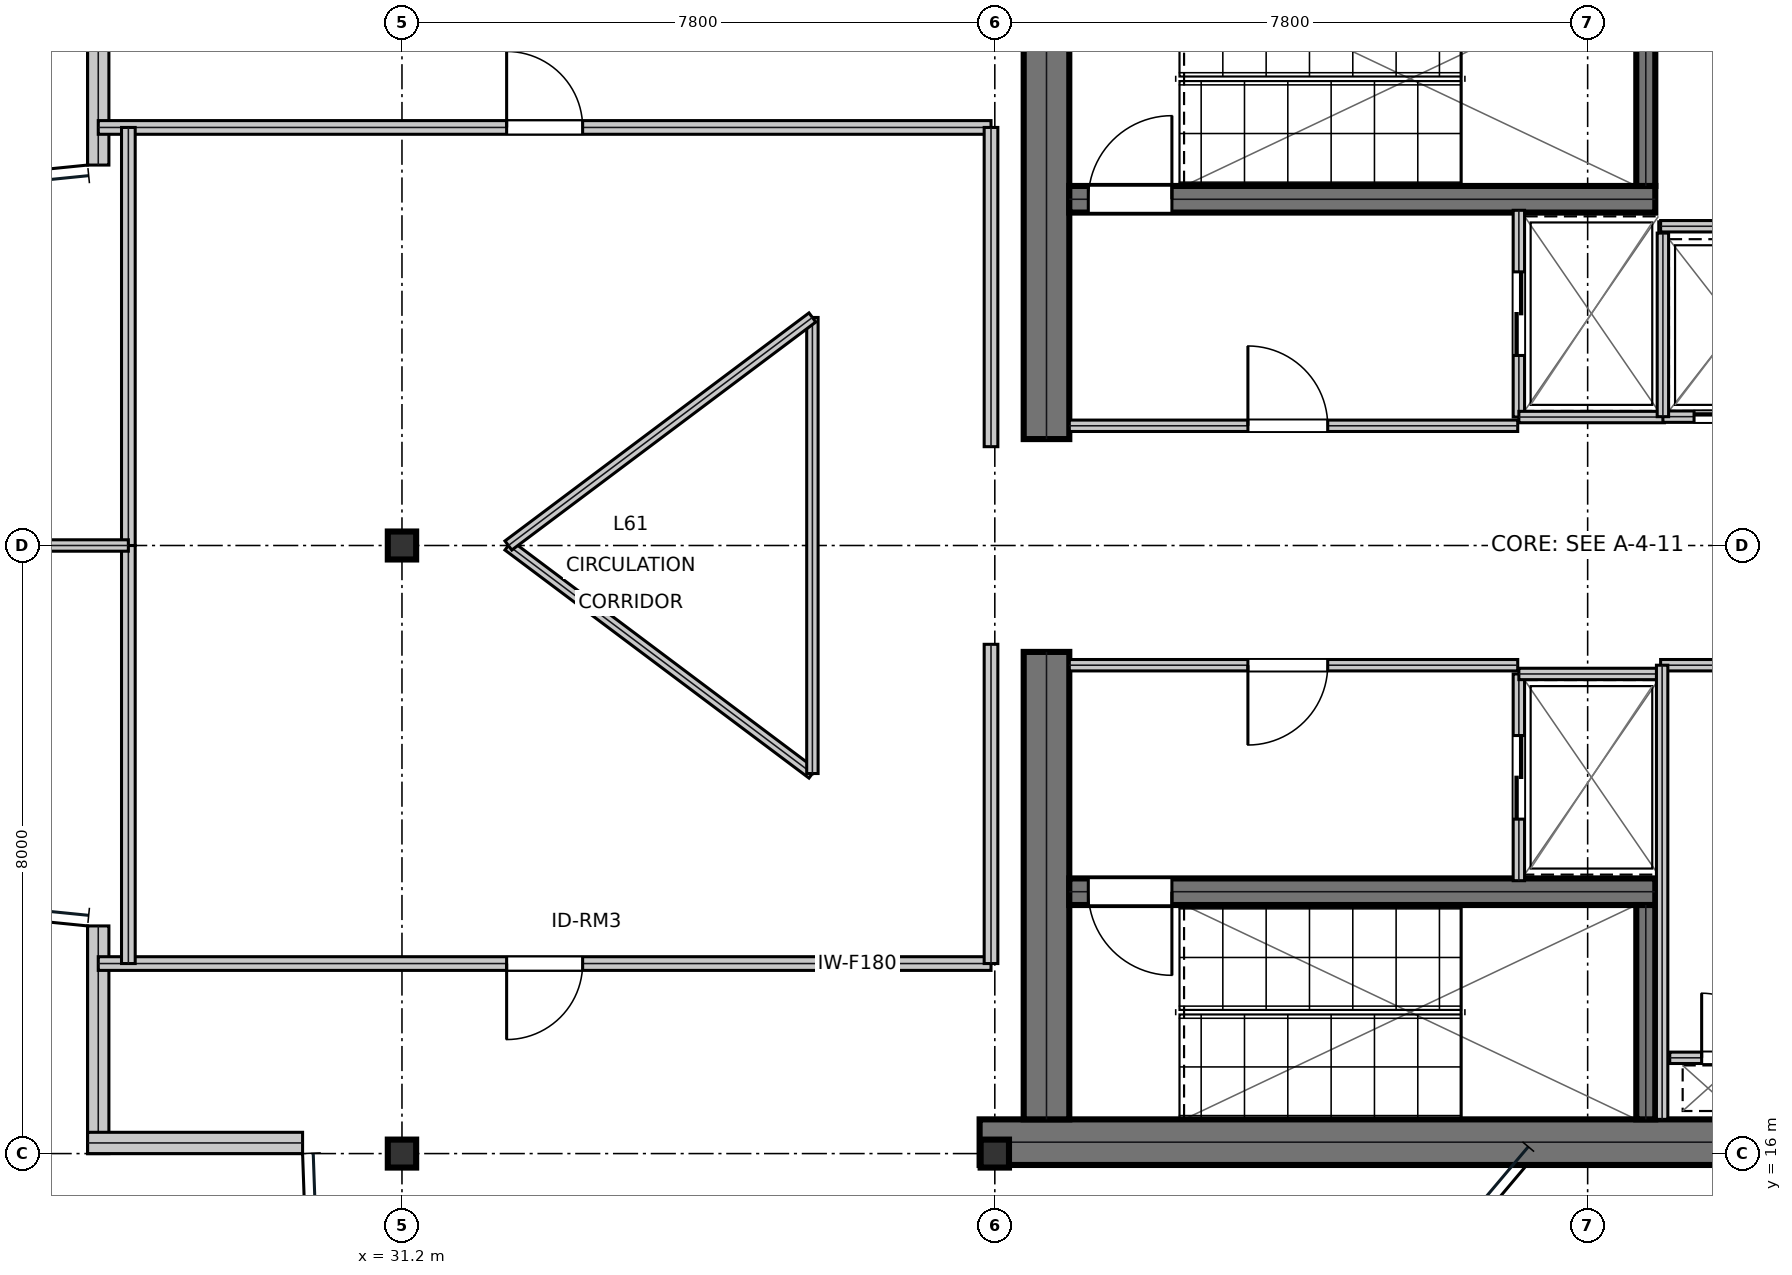
"""IFC4 building model, lengths in metres.
Left out: names, types, materials, properties, quantities, classifications, styles, units other than length and angle.
Written with IfcOpenShell. Run it as: python <this file> out.ifc"""

import sys

from ifc_helpers import new_model, si_unit, direction, frame, frame_2d, origin, origin_2d, place, context, subcontext, project, spatial, rectangle, i_section, extrude, element, fill, save


model = new_model("IFC4")
c1 = context("Model", 3, precision=1e-05, world=origin(), true_north=direction((0.0, 1.0)))
c2 = subcontext(c1, "Body", "Model", "MODEL_VIEW")
j1 = project(units=[si_unit("LENGTHUNIT", "METRE"), si_unit("PLANEANGLEUNIT", "RADIAN")], contexts=[c1])
p1 = place(None, origin())
s1 = spatial("IfcSite", under=j1, at=p1, CompositionType="ELEMENT")
p2 = place(p1, origin())
s2 = spatial("IfcBuilding", under=s1, at=p2, CompositionType="ELEMENT")
p3 = place(p2, frame((0.0, 0.0, 262.05)))
s3 = spatial("IfcBuildingStorey", under=s2, at=p3, CompositionType="ELEMENT", Elevation=262.05)
p4 = place(p3, frame((38.8, 16.15, 0.0), z_axis=(0.0, 0.0, 1.0), x_axis=(1.0, 0.0, 0.0)))
e1 = element("IfcWall", 1, at=p4, inside=s3, PredefinedType="SHEAR", context=c2, shape_type="SweptSolid", body=[
    extrude(rectangle(XDim=16.0, YDim=0.6, at=frame_2d((8.0, 0.0))), origin(), (0.0, 0.0, 1.0), 4.56),
])
for number, where, z_axis, x_axis in (
    (2, (39.68, 16.45, 0.0), (0.0, 0.0, 1.0), (0.0, 1.0, 0.0)),
    (3, (39.68, 25.4, 0.0), (0.0, 0.0, 1.0), (0.0, 1.0, 0.0)),
):
    element("IfcWall", number, at=place(p3, frame(where, z_axis=z_axis, x_axis=x_axis)), inside=s3, PredefinedType="SHEAR", context=c2, shape_type="SweptSolid", body=[
        extrude(rectangle(XDim=6.15, YDim=0.6, at=frame_2d((3.075, 0.0))), origin(), (0.0, 0.0, 1.0), 4.56),
    ])
p5 = place(p3, frame((39.98, 28.555, 0.0), z_axis=(0.0, 0.0, 1.0), x_axis=(1.0, 0.0, 0.0)))
e4 = element("IfcWall", 4, at=p5, inside=s3, PredefinedType="SHEAR", context=c2, shape_type="SweptSolid", body=[
    extrude(rectangle(XDim=7.71, YDim=0.35, at=frame_2d((3.855, 0.0))), origin(), (0.0, 0.0, 1.0), 4.56),
])
p6 = place(p5, frame((0.25, 0.0, 0.0)))
e5 = element("IfcOpeningElement", 5, at=p6, cuts=e4, PredefinedType="OPENING", context=c2, shape_type="SweptSolid", body=[
    extrude(rectangle(XDim=1.1, YDim=2.15, at=frame_2d((0.55, 1.075))), frame((0.0, 0.185, 0.0), z_axis=(0.0, -1.0, 0.0), x_axis=(1.0, 0.0, 0.0)), (0.0, 0.0, 1.0), 0.37),
])
p7 = place(p3, frame((39.98, 19.445, 0.0), z_axis=(0.0, 0.0, 1.0), x_axis=(1.0, 0.0, 0.0)))
e6 = element("IfcWall", 6, at=p7, inside=s3, PredefinedType="SHEAR", context=c2, shape_type="SweptSolid", body=[
    extrude(rectangle(XDim=7.71, YDim=0.35, at=frame_2d((3.855, 0.0))), origin(), (0.0, 0.0, 1.0), 4.56),
])
p8 = place(p7, frame((0.25, 0.0, 0.0)))
e7 = element("IfcOpeningElement", 7, at=p8, cuts=e6, PredefinedType="OPENING", context=c2, shape_type="SweptSolid", body=[
    extrude(rectangle(XDim=1.1, YDim=2.15, at=frame_2d((0.55, 1.075))), frame((0.0, 0.185, 0.0), z_axis=(0.0, -1.0, 0.0), x_axis=(1.0, 0.0, 0.0)), (0.0, 0.0, 1.0), 0.37),
])
for number, where, z_axis, x_axis in (
    (8, (47.565, 28.73, 0.0), (0.0, 0.0, 1.0), (0.0, 1.0, 0.0)),
    (9, (47.565, 16.45, 0.0), (0.0, 0.0, 1.0), (0.0, 1.0, 0.0)),
):
    element("IfcWall", number, at=place(p3, frame(where, z_axis=z_axis, x_axis=x_axis)), inside=s3, PredefinedType="SHEAR", context=c2, shape_type="SweptSolid", body=[
        extrude(rectangle(XDim=2.82, YDim=0.25, at=frame_2d((1.41, 0.0))), origin(), (0.0, 0.0, 1.0), 4.56),
    ])
for number, where, z_axis, x_axis in (
    (10, (31.2, 16.0, 0.0), (0.0, 0.0, 1.0), (1.0, 0.0, 0.0)),
    (11, (31.2, 24.0, 0.0), (0.0, 0.0, 1.0), (1.0, 0.0, 0.0)),
    (12, (39.0, 16.0, 0.0), (0.0, 0.0, 1.0), (1.0, 0.0, 0.0)),
):
    element("IfcColumn", number, at=place(p3, frame(where, z_axis=z_axis, x_axis=x_axis)), inside=s3, PredefinedType="COLUMN", context=c2, shape_type="SweptSolid", body=[
        extrude(i_section(OverallWidth=0.373, OverallDepth=0.368, WebThickness=0.015, FlangeThickness=0.024, at=origin_2d()), origin(), (0.0, 0.0, 1.0), 4.794),
    ])
for number, where, z_axis, x_axis in (
    (13, (27.204, 32.0, 0.0), (0.0, 0.0, 1.0), (0.0, -1.0, 0.0)),
    (14, (27.204, 18.995, 0.0), (0.0, 0.0, 1.0), (0.0, -1.0, 0.0)),
):
    element("IfcWall", number, at=place(p3, frame(where, z_axis=z_axis, x_axis=x_axis)), inside=s3, PredefinedType="STANDARD", context=c2, shape_type="SweptSolid", body=[
        extrude(rectangle(XDim=2.995, YDim=0.28, at=frame_2d((1.498, 0.0))), origin(), (0.0, 0.0, 1.0), 4.089),
    ])
p9 = place(p3, frame((27.064, 16.14, 0.0), z_axis=(0.0, 0.0, 1.0), x_axis=(1.0, 0.0, 0.0)))
e15 = element("IfcWall", 15, at=p9, inside=s3, PredefinedType="STANDARD", context=c2, shape_type="SweptSolid", body=[
    extrude(rectangle(XDim=2.828, YDim=0.28, at=frame_2d((1.414, 0.0))), origin(), (0.0, 0.0, 1.0), 4.56),
])
p10 = place(p3, frame((39.98, 25.575, 0.0), z_axis=(0.0, 0.0, 1.0), x_axis=(1.0, 0.0, 0.0)))
e16 = element("IfcWall", 16, at=p10, inside=s3, PredefinedType="PARTITIONING", context=c2, shape_type="SweptSolid", body=[
    extrude(rectangle(XDim=5.9, YDim=0.15, at=frame_2d((2.95, 0.0))), origin(), (0.0, 0.0, 1.0), 4.56),
])
p11 = place(p10, frame((2.35, 0.0, 0.0)))
e17 = element("IfcOpeningElement", 17, at=p11, cuts=e16, PredefinedType="OPENING", context=c2, shape_type="SweptSolid", body=[
    extrude(rectangle(XDim=1.05, YDim=2.15, at=frame_2d((0.525, 1.075))), frame((0.0, 0.085, 0.0), z_axis=(0.0, -1.0, 0.0), x_axis=(1.0, 0.0, 0.0)), (0.0, 0.0, 1.0), 0.17),
])
p12 = place(p3, frame((39.98, 22.425, 0.0), z_axis=(0.0, 0.0, 1.0), x_axis=(1.0, 0.0, 0.0)))
e18 = element("IfcWall", 18, at=p12, inside=s3, PredefinedType="PARTITIONING", context=c2, shape_type="SweptSolid", body=[
    extrude(rectangle(XDim=5.9, YDim=0.15, at=frame_2d((2.95, 0.0))), origin(), (0.0, 0.0, 1.0), 4.56),
])
p13 = place(p12, frame((2.35, 0.0, 0.0)))
e19 = element("IfcOpeningElement", 19, at=p13, cuts=e18, PredefinedType="OPENING", context=c2, shape_type="SweptSolid", body=[
    extrude(rectangle(XDim=1.05, YDim=2.15, at=frame_2d((0.525, 1.075))), frame((0.0, 0.085, 0.0), z_axis=(0.0, -1.0, 0.0), x_axis=(1.0, 0.0, 0.0)), (0.0, 0.0, 1.0), 0.17),
])
p14 = place(p3, frame((45.895, 25.69, 0.0), z_axis=(0.0, 0.0, 1.0), x_axis=(0.0, 1.0, 0.0)))
e20 = element("IfcWall", 20, at=p14, inside=s3, PredefinedType="PARTITIONING", context=c2, shape_type="SweptSolid", body=[
    extrude(rectangle(XDim=2.72, YDim=0.15, at=frame_2d((1.36, 0.0))), origin(), (0.0, 0.0, 1.0), 4.56),
])
p15 = place(p14, frame((0.81, 0.0, 0.0)))
e21 = element("IfcOpeningElement", 21, at=p15, cuts=e20, PredefinedType="OPENING", context=c2, shape_type="SweptSolid", body=[
    extrude(rectangle(XDim=1.1, YDim=2.15, at=frame_2d((0.55, 1.075))), frame((0.0, 0.085, 0.0), z_axis=(0.0, -1.0, 0.0), x_axis=(1.0, 0.0, 0.0)), (0.0, 0.0, 1.0), 0.17),
])
p16 = place(p3, frame((45.895, 25.69, 0.0), z_axis=(0.0, 0.0, 1.0), x_axis=(1.0, 0.0, 0.0)))
e22 = element("IfcWall", 22, at=p16, inside=s3, PredefinedType="PARTITIONING", context=c2, shape_type="SweptSolid", body=[
    extrude(rectangle(XDim=1.915, YDim=0.15, at=frame_2d((0.958, 0.0))), origin(), (0.0, 0.0, 1.0), 4.56),
])
p17 = place(p3, frame((45.895, 19.59, 0.0), z_axis=(0.0, 0.0, 1.0), x_axis=(0.0, 1.0, 0.0)))
e23 = element("IfcWall", 23, at=p17, inside=s3, PredefinedType="PARTITIONING", context=c2, shape_type="SweptSolid", body=[
    extrude(rectangle(XDim=2.72, YDim=0.15, at=frame_2d((1.36, 0.0))), origin(), (0.0, 0.0, 1.0), 4.56),
])
p18 = place(p17, frame((0.81, 0.0, 0.0)))
e24 = element("IfcOpeningElement", 24, at=p18, cuts=e23, PredefinedType="OPENING", context=c2, shape_type="SweptSolid", body=[
    extrude(rectangle(XDim=1.1, YDim=2.15, at=frame_2d((0.55, 1.075))), frame((0.0, 0.085, 0.0), z_axis=(0.0, -1.0, 0.0), x_axis=(1.0, 0.0, 0.0)), (0.0, 0.0, 1.0), 0.17),
])
p19 = place(p3, frame((45.895, 22.31, 0.0), z_axis=(0.0, 0.0, 1.0), x_axis=(1.0, 0.0, 0.0)))
e25 = element("IfcWall", 25, at=p19, inside=s3, PredefinedType="PARTITIONING", context=c2, shape_type="SweptSolid", body=[
    extrude(rectangle(XDim=1.915, YDim=0.15, at=frame_2d((0.958, 0.0))), origin(), (0.0, 0.0, 1.0), 4.56),
])
p20 = place(p3, frame((47.79, 25.695, 0.0), z_axis=(0.0, 0.0, 1.0), x_axis=(1.0, 0.0, 0.0)))
e26 = element("IfcWall", 26, at=p20, inside=s3, PredefinedType="PARTITIONING", context=c2, shape_type="SweptSolid", body=[
    extrude(rectangle(XDim=1.92, YDim=0.15, at=frame_2d((0.96, 0.0))), origin(), (0.0, 0.0, 1.0), 4.56),
])
p21 = place(p20, frame((0.41, 0.0, 0.0)))
e27 = element("IfcOpeningElement", 27, at=p21, cuts=e26, PredefinedType="OPENING", context=c2, shape_type="SweptSolid", body=[
    extrude(rectangle(XDim=1.1, YDim=2.15, at=frame_2d((0.55, 1.075))), frame((0.0, 0.085, 0.0), z_axis=(0.0, -1.0, 0.0), x_axis=(1.0, 0.0, 0.0)), (0.0, 0.0, 1.0), 0.17),
])
p22 = place(p3, frame((47.79, 25.695, 0.0), z_axis=(0.0, 0.0, 1.0), x_axis=(0.0, 1.0, 0.0)))
e28 = element("IfcWall", 28, at=p22, inside=s3, PredefinedType="PARTITIONING", context=c2, shape_type="SweptSolid", body=[
    extrude(rectangle(XDim=2.415, YDim=0.15, at=frame_2d((1.208, 0.0))), origin(), (0.0, 0.0, 1.0), 4.56),
])
p23 = place(p3, frame((47.88, 17.26, 0.0), z_axis=(0.0, 0.0, 1.0), x_axis=(1.0, 0.0, 0.0)))
e29 = element("IfcWall", 29, at=p23, inside=s3, PredefinedType="PARTITIONING", context=c2, shape_type="SweptSolid", body=[
    extrude(rectangle(XDim=1.72, YDim=0.15, at=frame_2d((0.86, 0.0))), origin(), (0.0, 0.0, 1.0), 4.56),
])
p24 = place(p23, frame((0.42, 0.0, 0.0)))
e30 = element("IfcOpeningElement", 30, at=p24, cuts=e29, PredefinedType="OPENING", context=c2, shape_type="SweptSolid", body=[
    extrude(rectangle(XDim=0.85, YDim=2.15, at=frame_2d((0.425, 1.075))), frame((0.0, 0.085, 0.0), z_axis=(0.0, -1.0, 0.0), x_axis=(1.0, 0.0, 0.0)), (0.0, 0.0, 1.0), 0.17),
])
p25 = place(p3, frame((47.76, 22.425, 0.0), z_axis=(0.0, 0.0, 1.0), x_axis=(1.0, 0.0, 0.0)))
e31 = element("IfcWall", 31, at=p25, inside=s3, PredefinedType="PARTITIONING", context=c2, shape_type="SweptSolid", body=[
    extrude(rectangle(XDim=1.96, YDim=0.15, at=frame_2d((0.98, 0.0))), origin(), (0.0, 0.0, 1.0), 4.56),
])
p26 = place(p3, frame((47.78, 16.45, 0.0), z_axis=(0.0, 0.0, 1.0), x_axis=(0.0, 1.0, 0.0)))
e32 = element("IfcWall", 32, at=p26, inside=s3, PredefinedType="PARTITIONING", context=c2, shape_type="SweptSolid", body=[
    extrude(rectangle(XDim=5.975, YDim=0.15, at=frame_2d((2.988, 0.0))), origin(), (0.0, 0.0, 1.0), 4.56),
])
p27 = place(p3, frame((47.76, 28.2, 0.0), z_axis=(0.0, 0.0, 1.0), x_axis=(1.0, 0.0, 0.0)))
e33 = element("IfcWall", 33, at=p27, inside=s3, PredefinedType="PARTITIONING", context=c2, shape_type="SweptSolid", body=[
    extrude(rectangle(XDim=2.04, YDim=0.15, at=frame_2d((1.02, 0.0))), origin(), (0.0, 0.0, 1.0), 4.56),
])
p28 = place(p3, frame((27.204, 18.5, 0.0), z_axis=(0.0, 0.0, 1.0), x_axis=(1.0, 0.0, 0.0)))
e34 = element("IfcWall", 34, at=p28, inside=s3, PredefinedType="SOLIDWALL", context=c2, shape_type="SweptSolid", body=[
    extrude(rectangle(XDim=11.746, YDim=0.18, at=frame_2d((5.873, 0.0))), origin(), (0.0, 0.0, 1.0), 4.02),
])
p29 = place(p28, frame((5.373, 0.0, 0.0)))
e35 = element("IfcOpeningElement", 35, at=p29, cuts=e34, PredefinedType="OPENING", context=c2, shape_type="SweptSolid", body=[
    extrude(rectangle(XDim=1.0, YDim=2.15, at=frame_2d((0.5, 1.075))), frame((0.0, 0.1, 0.0), z_axis=(0.0, -1.0, 0.0), x_axis=(1.0, 0.0, 0.0)), (0.0, 0.0, 1.0), 0.2),
])
p30 = place(p3, frame((27.204, 29.5, 0.0), z_axis=(0.0, 0.0, 1.0), x_axis=(1.0, 0.0, 0.0)))
e36 = element("IfcWall", 36, at=p30, inside=s3, PredefinedType="SOLIDWALL", context=c2, shape_type="SweptSolid", body=[
    extrude(rectangle(XDim=11.746, YDim=0.18, at=frame_2d((5.873, 0.0))), origin(), (0.0, 0.0, 1.0), 4.02),
])
p31 = place(p30, frame((5.373, 0.0, 0.0)))
e37 = element("IfcOpeningElement", 37, at=p31, cuts=e36, PredefinedType="OPENING", context=c2, shape_type="SweptSolid", body=[
    extrude(rectangle(XDim=1.0, YDim=2.15, at=frame_2d((0.5, 1.075))), frame((0.0, 0.1, 0.0), z_axis=(0.0, -1.0, 0.0), x_axis=(1.0, 0.0, 0.0)), (0.0, 0.0, 1.0), 0.2),
])
p32 = place(p3, frame((27.6, 18.5, 0.0), z_axis=(0.0, 0.0, 1.0), x_axis=(0.0, 1.0, 0.0)))
e38 = element("IfcWall", 38, at=p32, inside=s3, PredefinedType="SOLIDWALL", context=c2, shape_type="SweptSolid", body=[
    extrude(rectangle(XDim=5.5, YDim=0.18, at=frame_2d((2.75, 0.0))), origin(), (0.0, 0.0, 1.0), 4.02),
])
p33 = place(p3, frame((38.95, 18.5, 0.0), z_axis=(0.0, 0.0, 1.0), x_axis=(0.0, 1.0, 0.0)))
e39 = element("IfcWall", 39, at=p33, inside=s3, PredefinedType="SOLIDWALL", context=c2, shape_type="SweptSolid", body=[
    extrude(rectangle(XDim=4.2, YDim=0.18, at=frame_2d((2.1, 0.0))), origin(), (0.0, 0.0, 1.0), 4.29),
])
p34 = place(p3, frame((27.6, 24.0, 0.0), z_axis=(0.0, 0.0, 1.0), x_axis=(0.0, 1.0, 0.0)))
e40 = element("IfcWall", 40, at=p34, inside=s3, PredefinedType="SOLIDWALL", context=c2, shape_type="SweptSolid", body=[
    extrude(rectangle(XDim=5.5, YDim=0.18, at=frame_2d((2.75, 0.0))), origin(), (0.0, 0.0, 1.0), 4.02),
])
p35 = place(p3, frame((38.95, 25.3, 0.0), z_axis=(0.0, 0.0, 1.0), x_axis=(0.0, 1.0, 0.0)))
e41 = element("IfcWall", 41, at=p35, inside=s3, PredefinedType="SOLIDWALL", context=c2, shape_type="SweptSolid", body=[
    extrude(rectangle(XDim=4.2, YDim=0.18, at=frame_2d((2.1, 0.0))), origin(), (0.0, 0.0, 1.0), 4.29),
])
p36 = place(p3, frame((25.084, 24.0, 0.0), z_axis=(0.0, 0.0, 1.0), x_axis=(1.0, 0.0, 0.0)))
e42 = element("IfcWall", 42, at=p36, inside=s3, PredefinedType="MOVABLE", context=c2, shape_type="SweptSolid", body=[
    extrude(rectangle(XDim=2.516, YDim=0.15, at=frame_2d((1.258, 0.0))), origin(), (0.0, 0.0, 1.0), 4.29),
])
p37 = place(p3, frame((32.6, 24.0, 0.0), z_axis=(0.0, 0.0, 1.0), x_axis=(0.8, -0.6, 0.0)))
e43 = element("IfcWall", 43, at=p37, inside=s3, PredefinedType="MOVABLE", context=c2, shape_type="SweptSolid", body=[
    extrude(rectangle(XDim=5.0, YDim=0.15, at=frame_2d((2.5, 0.0))), origin(), (0.0, 0.0, 1.0), 4.56),
])
p38 = place(p3, frame((36.6, 21.0, 0.0), z_axis=(0.0, 0.0, 1.0), x_axis=(0.0, 1.0, 0.0)))
e44 = element("IfcWall", 44, at=p38, inside=s3, PredefinedType="MOVABLE", context=c2, shape_type="SweptSolid", body=[
    extrude(rectangle(XDim=6.0, YDim=0.15, at=frame_2d((3.0, 0.0))), origin(), (0.0, 0.0, 1.0), 4.56),
])
p39 = place(p3, frame((36.6, 27.0, 0.0), z_axis=(0.0, 0.0, 1.0), x_axis=(-0.8, -0.6, 0.0)))
e45 = element("IfcWall", 45, at=p39, inside=s3, PredefinedType="MOVABLE", context=c2, shape_type="SweptSolid", body=[
    extrude(rectangle(XDim=5.0, YDim=0.15, at=frame_2d((2.5, 0.0))), origin(), (0.0, 0.0, 1.0), 4.56),
])
p40 = place(p11, origin())
e46 = element("IfcDoor", 46, at=p40, inside=s3, OperationType="SINGLE_SWING_LEFT", PredefinedType="DOOR", context=c2, shape_type="SweptSolid", body=[
    extrude(rectangle(XDim=1.05, YDim=2.15, at=frame_2d((0.525, 1.075))), frame((0.0, 0.025, 0.0), z_axis=(0.0, -1.0, 0.0), x_axis=(1.0, 0.0, 0.0)), (0.0, 0.0, 1.0), 0.05),
])
fill(e17, e46)
p41 = place(p13, frame((1.05, 0.0, 0.0), z_axis=(0.0, 0.0, 1.0), x_axis=(-1.0, 0.0, 0.0)))
e47 = element("IfcDoor", 47, at=p41, inside=s3, OperationType="SINGLE_SWING_RIGHT", PredefinedType="DOOR", context=c2, shape_type="SweptSolid", body=[
    extrude(rectangle(XDim=1.05, YDim=2.15, at=frame_2d((0.525, 1.075))), frame((0.0, 0.025, 0.0), z_axis=(0.0, -1.0, 0.0), x_axis=(1.0, 0.0, 0.0)), (0.0, 0.0, 1.0), 0.05),
])
fill(e19, e47)
p42 = place(p15, frame((1.1, 0.0, 0.0), z_axis=(0.0, 0.0, 1.0), x_axis=(-1.0, 0.0, 0.0)))
e48 = element("IfcDoor", 48, at=p42, inside=s3, OperationType="DOUBLE_DOOR_SLIDING", PredefinedType="DOOR", context=c2, shape_type="SweptSolid", body=[
    extrude(rectangle(XDim=1.1, YDim=2.15, at=frame_2d((0.55, 1.075))), frame((0.0, 0.025, 0.0), z_axis=(0.0, -1.0, 0.0), x_axis=(1.0, 0.0, 0.0)), (0.0, 0.0, 1.0), 0.05),
])
fill(e21, e48)
p43 = place(p18, frame((1.1, 0.0, 0.0), z_axis=(0.0, 0.0, 1.0), x_axis=(-1.0, 0.0, 0.0)))
e49 = element("IfcDoor", 49, at=p43, inside=s3, OperationType="DOUBLE_DOOR_SLIDING", PredefinedType="DOOR", context=c2, shape_type="SweptSolid", body=[
    extrude(rectangle(XDim=1.1, YDim=2.15, at=frame_2d((0.55, 1.075))), frame((0.0, 0.025, 0.0), z_axis=(0.0, -1.0, 0.0), x_axis=(1.0, 0.0, 0.0)), (0.0, 0.0, 1.0), 0.05),
])
fill(e24, e49)
p44 = place(p21, frame((1.1, 0.0, 0.0), z_axis=(0.0, 0.0, 1.0), x_axis=(-1.0, 0.0, 0.0)))
e50 = element("IfcDoor", 50, at=p44, inside=s3, OperationType="DOUBLE_DOOR_SLIDING", PredefinedType="DOOR", context=c2, shape_type="SweptSolid", body=[
    extrude(rectangle(XDim=1.1, YDim=2.15, at=frame_2d((0.55, 1.075))), frame((0.0, 0.025, 0.0), z_axis=(0.0, -1.0, 0.0), x_axis=(1.0, 0.0, 0.0)), (0.0, 0.0, 1.0), 0.05),
])
fill(e27, e50)
p45 = place(p24, origin())
e51 = element("IfcDoor", 51, at=p45, inside=s3, OperationType="SINGLE_SWING_LEFT", PredefinedType="TRAPDOOR", context=c2, shape_type="SweptSolid", body=[
    extrude(rectangle(XDim=0.85, YDim=2.15, at=frame_2d((0.425, 1.075))), frame((0.0, 0.025, 0.0), z_axis=(0.0, -1.0, 0.0), x_axis=(1.0, 0.0, 0.0)), (0.0, 0.0, 1.0), 0.05),
])
fill(e30, e51)
p46 = place(p29, frame((1.0, 0.0, 0.0), z_axis=(0.0, 0.0, 1.0), x_axis=(-1.0, 0.0, 0.0)))
e52 = element("IfcDoor", 52, at=p46, inside=s3, OperationType="SINGLE_SWING_RIGHT", PredefinedType="DOOR", context=c2, shape_type="SweptSolid", body=[
    extrude(rectangle(XDim=1.0, YDim=2.15, at=frame_2d((0.5, 1.075))), frame((0.0, 0.025, 0.0), z_axis=(0.0, -1.0, 0.0), x_axis=(1.0, 0.0, 0.0)), (0.0, 0.0, 1.0), 0.05),
])
fill(e35, e52)
p47 = place(p31, origin())
e53 = element("IfcDoor", 53, at=p47, inside=s3, OperationType="SINGLE_SWING_LEFT", PredefinedType="DOOR", context=c2, shape_type="SweptSolid", body=[
    extrude(rectangle(XDim=1.0, YDim=2.15, at=frame_2d((0.5, 1.075))), frame((0.0, 0.025, 0.0), z_axis=(0.0, -1.0, 0.0), x_axis=(1.0, 0.0, 0.0)), (0.0, 0.0, 1.0), 0.05),
])
fill(e37, e53)
p48 = place(p6, origin())
e54 = element("IfcDoor", 54, at=p48, inside=s3, OperationType="SINGLE_SWING_RIGHT", PredefinedType="DOOR", context=c2, shape_type="SweptSolid", body=[
    extrude(rectangle(XDim=1.1, YDim=2.15, at=frame_2d((0.55, 1.075))), frame((0.0, 0.025, 0.0), z_axis=(0.0, -1.0, 0.0), x_axis=(1.0, 0.0, 0.0)), (0.0, 0.0, 1.0), 0.05),
])
fill(e5, e54)
p49 = place(p8, frame((1.1, 0.0, 0.0), z_axis=(0.0, 0.0, 1.0), x_axis=(-1.0, 0.0, 0.0)))
e55 = element("IfcDoor", 55, at=p49, inside=s3, OperationType="SINGLE_SWING_LEFT", PredefinedType="DOOR", context=c2, shape_type="SweptSolid", body=[
    extrude(rectangle(XDim=1.1, YDim=2.15, at=frame_2d((0.55, 1.075))), frame((0.0, 0.025, 0.0), z_axis=(0.0, -1.0, 0.0), x_axis=(1.0, 0.0, 0.0)), (0.0, 0.0, 1.0), 0.05),
])
fill(e7, e55)
save(model, sys.argv[1])
